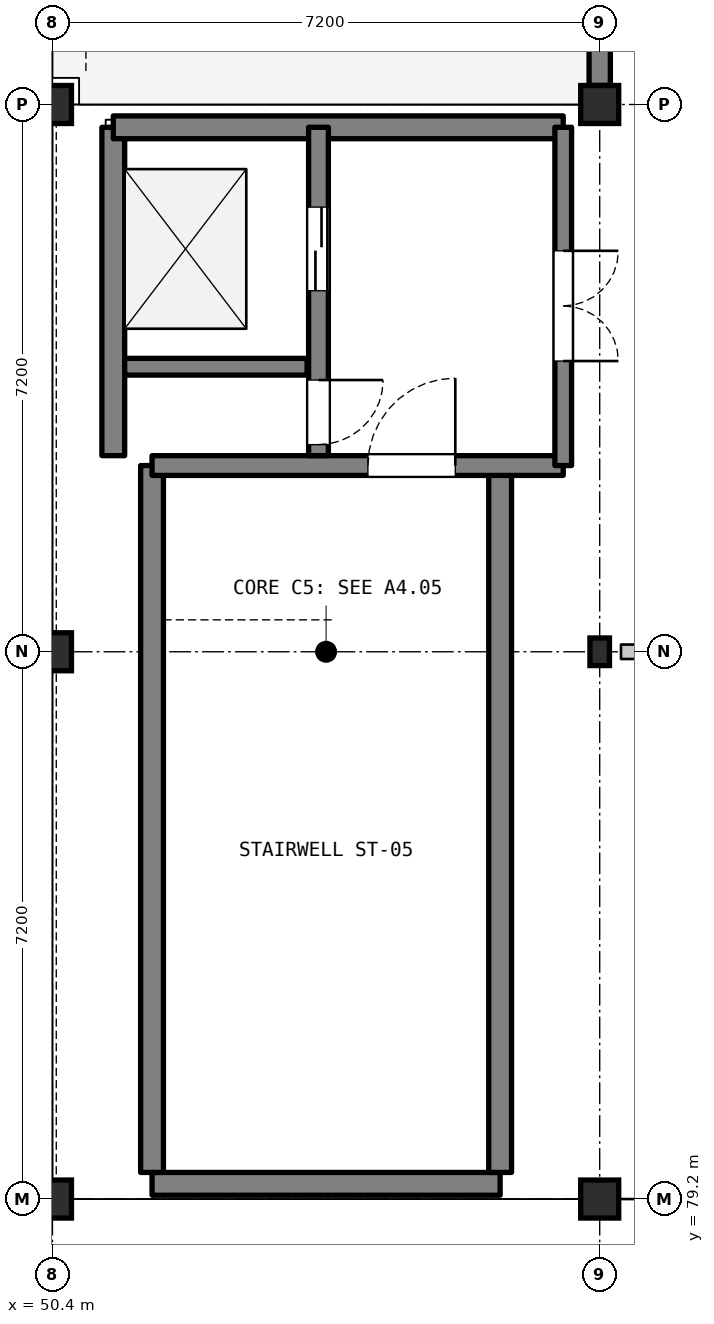
"""IFC4 building model, lengths in metres.
Left out: names, types, materials, properties, quantities, classifications, styles, units other than length and angle.
Written with IfcOpenShell. Run it as: python <this file> out.ifc"""

import sys

from ifc_helpers import new_model, si_unit, direction, frame, frame_2d, origin, origin_2d, place, context, subcontext, project, spatial, rectangle, i_section, extrude, element, fill, save


model = new_model("IFC4")
c1 = context("Model", 3, precision=1e-05, world=origin(), true_north=direction((0.0, 1.0)))
c2 = subcontext(c1, "Body", "Model", "MODEL_VIEW")
j1 = project(units=[si_unit("LENGTHUNIT", "METRE"), si_unit("PLANEANGLEUNIT", "RADIAN")], contexts=[c1])
p1 = place(None, origin())
s1 = spatial("IfcSite", under=j1, at=p1, CompositionType="ELEMENT")
p2 = place(p1, origin())
s2 = spatial("IfcBuilding", under=s1, at=p2, CompositionType="ELEMENT")
p3 = place(p2, frame((0.0, 0.0, 25.8)))
s3 = spatial("IfcBuildingStorey", under=s2, at=p3, CompositionType="ELEMENT", Elevation=25.8)
p4 = place(p3, frame((50.4, 79.2, 0.0), z_axis=(0.0, 0.0, 1.0), x_axis=(1.0, 0.0, 0.0)))
e1 = element("IfcColumn", 1, at=p4, inside=s3, PredefinedType="COLUMN", context=c2, shape_type="SweptSolid", body=[
    extrude(rectangle(XDim=0.5, YDim=0.5, at=origin_2d()), origin(), (0.0, 0.0, 1.0), 2.437),
])
p5 = place(p3, frame((50.4, 86.4, 0.0), z_axis=(0.0, 0.0, 1.0), x_axis=(1.0, 0.0, 0.0)))
e2 = element("IfcColumn", 2, at=p5, inside=s3, PredefinedType="COLUMN", context=c2, shape_type="SweptSolid", body=[
    extrude(rectangle(XDim=0.5, YDim=0.5, at=origin_2d()), origin(), (0.0, 0.0, 1.0), 3.733),
])
p6 = place(p3, frame((50.4, 93.6, 0.0), z_axis=(0.0, 0.0, 1.0), x_axis=(1.0, 0.0, 0.0)))
e3 = element("IfcColumn", 3, at=p6, inside=s3, PredefinedType="COLUMN", context=c2, shape_type="SweptSolid", body=[
    extrude(rectangle(XDim=0.5, YDim=0.5, at=origin_2d()), origin(), (0.0, 0.0, 1.0), 4.2),
])
p7 = place(p3, frame((57.6, 79.2, 0.0), z_axis=(0.0, 0.0, 1.0), x_axis=(1.0, 0.0, 0.0)))
e4 = element("IfcColumn", 4, at=p7, inside=s3, PredefinedType="COLUMN", context=c2, shape_type="SweptSolid", body=[
    extrude(rectangle(XDim=0.5, YDim=0.5, at=origin_2d()), origin(), (0.0, 0.0, 1.0), 2.437),
])
p8 = place(p3, frame((57.6, 86.4, 0.0), z_axis=(0.0, 0.0, 1.0), x_axis=(1.0, 0.0, 0.0)))
e5 = element("IfcColumn", 5, at=p8, inside=s3, PredefinedType="COLUMN", context=c2, shape_type="SweptSolid", body=[
    extrude(i_section(OverallWidth=0.257, OverallDepth=0.363, WebThickness=0.013, FlangeThickness=0.022, FilletRadius=0.015, at=origin_2d()), origin(), (0.0, 0.0, 1.0), 3.733),
])
p9 = place(p3, frame((57.6, 93.6, 0.0), z_axis=(0.0, 0.0, 1.0), x_axis=(1.0, 0.0, 0.0)))
e6 = element("IfcColumn", 6, at=p9, inside=s3, PredefinedType="COLUMN", context=c2, shape_type="SweptSolid", body=[
    extrude(rectangle(XDim=0.5, YDim=0.5, at=origin_2d()), origin(), (0.0, 0.0, 1.0), 4.2),
])
p10 = place(p3, frame((57.6, 93.85, 0.0), z_axis=(0.0, 0.0, 1.0), x_axis=(0.0, 1.0, 0.0)))
e7 = element("IfcWall", 7, at=p10, inside=s3, PredefinedType="SOLIDWALL", context=c2, shape_type="SweptSolid", body=[
    extrude(rectangle(XDim=6.7, YDim=0.28, at=frame_2d((3.35, 0.0))), origin(), (0.0, 0.0, 1.0), 4.0),
])
p11 = place(p10, frame((2.5, 0.0, 0.0)))
e8 = element("IfcOpeningElement", 8, at=p11, cuts=e7, PredefinedType="OPENING", context=c2, shape_type="SweptSolid", body=[
    extrude(rectangle(XDim=1.7, YDim=2.25, at=frame_2d((0.85, 1.125))), frame((0.0, 0.15, 0.0), z_axis=(0.0, -1.0, 0.0), x_axis=(1.0, 0.0, 0.0)), (0.0, 0.0, 1.0), 0.3),
])
p12 = place(p3, frame((51.71, 79.4, 0.0), z_axis=(0.0, 0.0, 1.0), x_axis=(1.0, 0.0, 0.0)))
e9 = element("IfcWall", 9, at=p12, inside=s3, PredefinedType="SHEAR", context=c2, shape_type="SweptSolid", body=[
    extrude(rectangle(XDim=4.58, YDim=0.3, at=frame_2d((2.29, 0.0))), origin(), (0.0, 0.0, 1.0), 5.26),
])
for number, where, z_axis, x_axis in (
    (10, (51.71, 79.55, 0.0), (0.0, 0.0, 1.0), (0.0, 1.0, 0.0)),
    (11, (56.29, 79.55, 0.0), (0.0, 0.0, 1.0), (0.0, 1.0, 0.0)),
):
    element("IfcWall", number, at=place(p3, frame(where, z_axis=z_axis, x_axis=x_axis)), inside=s3, PredefinedType="SHEAR", context=c2, shape_type="SweptSolid", body=[
        extrude(rectangle(XDim=9.3, YDim=0.3, at=frame_2d((4.65, 0.0))), origin(), (0.0, 0.0, 1.0), 5.26),
    ])
p13 = place(p3, frame((51.71, 88.85, 0.0), z_axis=(0.0, 0.0, 1.0), x_axis=(1.0, 0.0, 0.0)))
e12 = element("IfcWall", 12, at=p13, inside=s3, PredefinedType="SHEAR", context=c2, shape_type="SweptSolid", body=[
    extrude(rectangle(XDim=5.41, YDim=0.26, at=frame_2d((2.705, 0.0))), origin(), (0.0, 0.0, 1.0), 5.26),
])
p14 = place(p13, frame((2.84, 0.0, 0.0)))
e13 = element("IfcOpeningElement", 13, at=p14, cuts=e12, PredefinedType="OPENING", context=c2, shape_type="SweptSolid", body=[
    extrude(rectangle(XDim=1.15, YDim=2.15, at=frame_2d((0.575, 1.075))), frame((0.0, 0.14, 0.0), z_axis=(0.0, -1.0, 0.0), x_axis=(1.0, 0.0, 0.0)), (0.0, 0.0, 1.0), 0.28),
])
p15 = place(p3, frame((51.2, 88.98, 0.0), z_axis=(0.0, 0.0, 1.0), x_axis=(0.0, 1.0, 0.0)))
e14 = element("IfcWall", 14, at=p15, inside=s3, PredefinedType="SHEAR", context=c2, shape_type="SweptSolid", body=[
    extrude(rectangle(XDim=4.32, YDim=0.3, at=frame_2d((2.16, 0.0))), origin(), (0.0, 0.0, 1.0), 5.26),
])
p16 = place(p3, frame((51.2, 93.3, 0.0), z_axis=(0.0, 0.0, 1.0), x_axis=(1.0, 0.0, 0.0)))
e15 = element("IfcWall", 15, at=p16, inside=s3, PredefinedType="SHEAR", context=c2, shape_type="SweptSolid", body=[
    extrude(rectangle(XDim=5.92, YDim=0.3, at=frame_2d((2.96, 0.0))), origin(), (0.0, 0.0, 1.0), 5.26),
])
p17 = place(p3, frame((51.35, 90.15, 0.0), z_axis=(0.0, 0.0, 1.0), x_axis=(1.0, 0.0, 0.0)))
e16 = element("IfcWall", 16, at=p17, inside=s3, PredefinedType="SHEAR", context=c2, shape_type="SweptSolid", body=[
    extrude(rectangle(XDim=2.4, YDim=0.22, at=frame_2d((1.2, 0.0))), origin(), (0.0, 0.0, 1.0), 5.26),
])
p18 = place(p3, frame((53.9, 93.3, 0.0), z_axis=(0.0, 0.0, 1.0), x_axis=(0.0, -1.0, 0.0)))
e17 = element("IfcWall", 17, at=p18, inside=s3, PredefinedType="SHEAR", context=c2, shape_type="SweptSolid", body=[
    extrude(rectangle(XDim=4.32, YDim=0.26, at=frame_2d((2.16, 0.0))), origin(), (0.0, 0.0, 1.0), 5.26),
])
p19 = place(p18, frame((1.05, 0.0, 0.0)))
e18 = element("IfcOpeningElement", 18, at=p19, cuts=e17, PredefinedType="OPENING", context=c2, shape_type="SweptSolid", body=[
    extrude(rectangle(XDim=1.1, YDim=2.15, at=frame_2d((0.55, 1.075))), frame((0.0, 0.14, 0.0), z_axis=(0.0, -1.0, 0.0), x_axis=(1.0, 0.0, 0.0)), (0.0, 0.0, 1.0), 0.28),
])
p20 = place(p18, frame((3.325, 0.0, 0.0)))
e19 = element("IfcOpeningElement", 19, at=p20, cuts=e17, PredefinedType="OPENING", context=c2, shape_type="SweptSolid", body=[
    extrude(rectangle(XDim=0.85, YDim=2.05, at=frame_2d((0.425, 1.025))), frame((0.0, 0.14, 0.0), z_axis=(0.0, -1.0, 0.0), x_axis=(1.0, 0.0, 0.0)), (0.0, 0.0, 1.0), 0.28),
])
p21 = place(p3, frame((57.12, 93.3, 0.0), z_axis=(0.0, 0.0, 1.0), x_axis=(0.0, -1.0, 0.0)))
e20 = element("IfcWall", 20, at=p21, inside=s3, PredefinedType="SHEAR", context=c2, shape_type="SweptSolid", body=[
    extrude(rectangle(XDim=4.45, YDim=0.22, at=frame_2d((2.225, 0.0))), origin(), (0.0, 0.0, 1.0), 5.26),
])
p22 = place(p21, frame((1.625, 0.0, 0.0)))
e21 = element("IfcOpeningElement", 21, at=p22, cuts=e20, PredefinedType="OPENING", context=c2, shape_type="SweptSolid", body=[
    extrude(rectangle(XDim=1.45, YDim=2.2, at=frame_2d((0.725, 1.1))), frame((0.0, 0.12, 0.0), z_axis=(0.0, -1.0, 0.0), x_axis=(1.0, 0.0, 0.0)), (0.0, 0.0, 1.0), 0.24),
])
p23 = place(p3, frame((57.88, 86.4, 0.0), z_axis=(0.0, 0.0, 1.0), x_axis=(1.0, 0.0, 0.0)))
e22 = element("IfcWall", 22, at=p23, inside=s3, PredefinedType="PARTITIONING", context=c2, shape_type="SweptSolid", body=[
    extrude(rectangle(XDim=2.0, YDim=0.19, at=frame_2d((1.0, 0.0))), origin(), (0.0, 0.0, 1.0), 3.194),
])
p24 = place(p23, frame((0.54, 0.0, 0.0)))
e23 = element("IfcOpeningElement", 23, at=p24, cuts=e22, PredefinedType="OPENING", context=c2, shape_type="SweptSolid", body=[
    extrude(rectangle(XDim=0.92, YDim=2.1, at=frame_2d((0.46, 1.05))), frame((0.0, 0.105, 0.0), z_axis=(0.0, -1.0, 0.0), x_axis=(1.0, 0.0, 0.0)), (0.0, 0.0, 1.0), 0.21),
])
p25 = place(p14, origin())
e24 = element("IfcDoor", 24, at=p25, inside=s3, OperationType="SINGLE_SWING_RIGHT", PredefinedType="DOOR", context=c2, shape_type="SweptSolid", body=[
    extrude(rectangle(XDim=1.15, YDim=2.15, at=frame_2d((0.575, 1.075))), frame((0.0, 0.025, 0.0), z_axis=(0.0, -1.0, 0.0), x_axis=(1.0, 0.0, 0.0)), (0.0, 0.0, 1.0), 0.05),
])
fill(e13, e24)
p26 = place(p19, origin())
e25 = element("IfcDoor", 25, at=p26, inside=s3, OperationType="DOUBLE_DOOR_SLIDING", PredefinedType="DOOR", context=c2, shape_type="SweptSolid", body=[
    extrude(rectangle(XDim=1.1, YDim=2.15, at=frame_2d((0.55, 1.075))), frame((0.0, 0.025, 0.0), z_axis=(0.0, -1.0, 0.0), x_axis=(1.0, 0.0, 0.0)), (0.0, 0.0, 1.0), 0.05),
])
fill(e18, e25)
p27 = place(p20, origin())
e26 = element("IfcDoor", 26, at=p27, inside=s3, OperationType="SINGLE_SWING_LEFT", PredefinedType="DOOR", context=c2, shape_type="SweptSolid", body=[
    extrude(rectangle(XDim=0.85, YDim=2.05, at=frame_2d((0.425, 1.025))), frame((0.0, 0.025, 0.0), z_axis=(0.0, -1.0, 0.0), x_axis=(1.0, 0.0, 0.0)), (0.0, 0.0, 1.0), 0.05),
])
fill(e19, e26)
p28 = place(p22, origin())
e27 = element("IfcDoor", 27, at=p28, inside=s3, OperationType="DOUBLE_DOOR_SINGLE_SWING", PredefinedType="DOOR", context=c2, shape_type="SweptSolid", body=[
    extrude(rectangle(XDim=1.45, YDim=2.2, at=frame_2d((0.725, 1.1))), frame((0.0, 0.025, 0.0), z_axis=(0.0, -1.0, 0.0), x_axis=(1.0, 0.0, 0.0)), (0.0, 0.0, 1.0), 0.05),
])
fill(e21, e27)
save(model, sys.argv[1])
